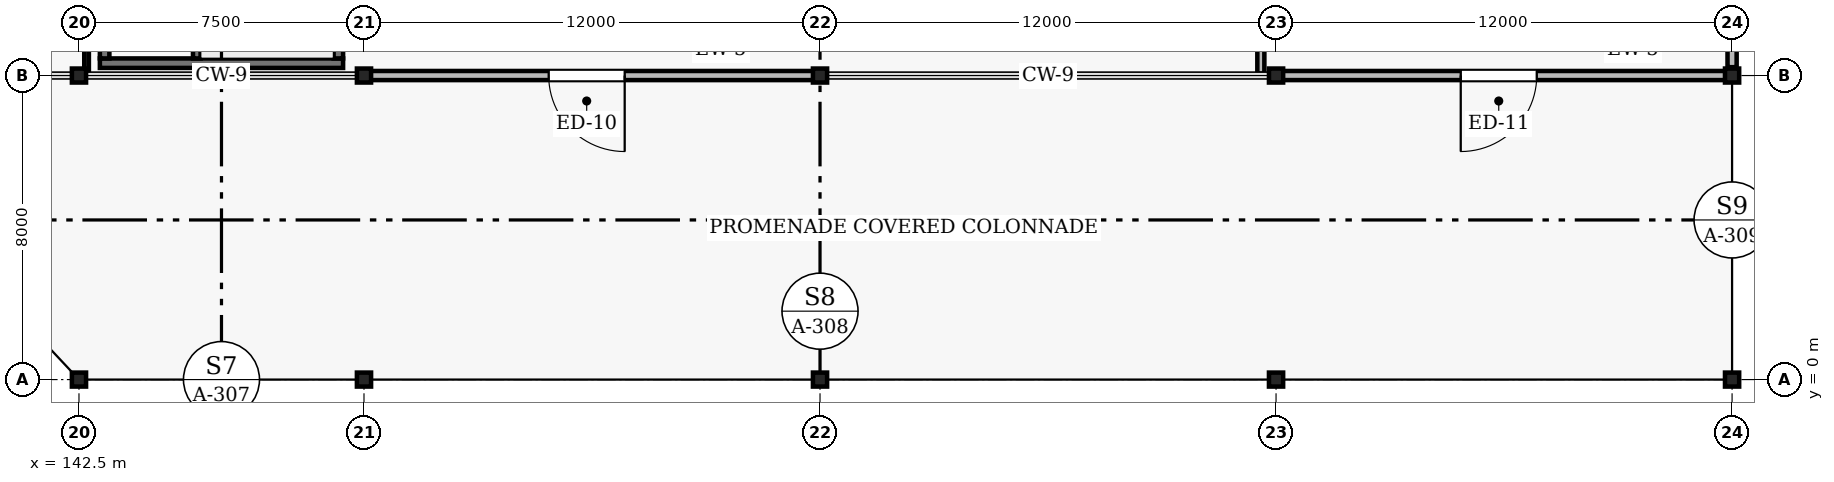
"""IFC4 building model, lengths in metres.
Left out: names, types, materials, properties, quantities, classifications, styles, units other than length and angle.
Written with IfcOpenShell. Run it as: python <this file> out.ifc"""

import sys

from ifc_helpers import new_model, si_unit, direction, frame, frame_2d, origin, origin_2d, place, context, subcontext, project, spatial, rectangle, i_section, extrude, element, fill, save


model = new_model("IFC4")
c1 = context("Model", 3, precision=1e-05, world=origin(), true_north=direction((0.0, 1.0)))
c2 = subcontext(c1, "Body", "Model", "MODEL_VIEW")
j1 = project(units=[si_unit("LENGTHUNIT", "METRE"), si_unit("PLANEANGLEUNIT", "RADIAN")], contexts=[c1])
p1 = place(None, origin())
s1 = spatial("IfcSite", under=j1, at=p1, CompositionType="ELEMENT")
p2 = place(p1, origin())
s2 = spatial("IfcBuilding", under=s1, at=p2, CompositionType="ELEMENT")
p3 = place(p2, origin())
s3 = spatial("IfcBuildingStorey", under=s2, at=p3, CompositionType="ELEMENT", Elevation=0.0)
for number, where, z_axis, x_axis in (
    (1, (142.5, 0.0, 0.0), (0.0, 0.0, 1.0), (1.0, 0.0, 0.0)),
    (2, (142.5, 8.0, 0.0), (0.0, 0.0, 1.0), (1.0, 0.0, 0.0)),
    (3, (150.0, 0.0, 0.0), (0.0, 0.0, 1.0), (1.0, 0.0, 0.0)),
    (4, (150.0, 8.0, 0.0), (0.0, 0.0, 1.0), (1.0, 0.0, 0.0)),
    (5, (162.0, 0.0, 0.0), (0.0, 0.0, 1.0), (1.0, 0.0, 0.0)),
    (6, (162.0, 8.0, 0.0), (0.0, 0.0, 1.0), (1.0, 0.0, 0.0)),
    (7, (174.0, 0.0, 0.0), (0.0, 0.0, 1.0), (1.0, 0.0, 0.0)),
    (8, (174.0, 8.0, 0.0), (0.0, 0.0, 1.0), (1.0, 0.0, 0.0)),
    (9, (186.0, 0.0, 0.0), (0.0, 0.0, 1.0), (1.0, 0.0, 0.0)),
    (10, (186.0, 8.0, 0.0), (0.0, 0.0, 1.0), (1.0, 0.0, 0.0)),
):
    element("IfcColumn", number, at=place(p3, frame(where, z_axis=z_axis, x_axis=x_axis)), inside=s3, PredefinedType="COLUMN", context=c2, shape_type="SweptSolid", body=[
        extrude(i_section(OverallWidth=0.373, OverallDepth=0.368, WebThickness=0.015, FlangeThickness=0.024, FilletRadius=0.015, at=origin_2d()), origin(), (0.0, 0.0, 1.0), 4.5),
    ])
p4 = place(p3, frame((150.08, 8.0, 0.0), z_axis=(0.0, 0.0, 1.0), x_axis=(1.0, 0.0, 0.0)))
e11 = element("IfcWall", 11, at=p4, inside=s3, PredefinedType="SOLIDWALL", context=c2, shape_type="SweptSolid", body=[
    extrude(rectangle(XDim=11.84, YDim=0.24, at=frame_2d((5.92, 0.0))), origin(), (0.0, 0.0, 1.0), 3.75),
])
p5 = place(p4, frame((4.78, 0.0, 0.0)))
e12 = element("IfcOpeningElement", 12, at=p5, cuts=e11, PredefinedType="OPENING", context=c2, shape_type="SweptSolid", body=[
    extrude(rectangle(XDim=2.0, YDim=2.2, at=frame_2d((1.0, 1.1))), frame((0.0, 0.13, 0.0), z_axis=(0.0, -1.0, 0.0), x_axis=(1.0, 0.0, 0.0)), (0.0, 0.0, 1.0), 0.26),
])
p6 = place(p3, frame((174.08, 8.0, 0.0), z_axis=(0.0, 0.0, 1.0), x_axis=(1.0, 0.0, 0.0)))
e13 = element("IfcWall", 13, at=p6, inside=s3, PredefinedType="SOLIDWALL", context=c2, shape_type="SweptSolid", body=[
    extrude(rectangle(XDim=11.84, YDim=0.24, at=frame_2d((5.92, 0.0))), origin(), (0.0, 0.0, 1.0), 3.75),
])
p7 = place(p6, frame((4.78, 0.0, 0.0)))
e14 = element("IfcOpeningElement", 14, at=p7, cuts=e13, PredefinedType="OPENING", context=c2, shape_type="SweptSolid", body=[
    extrude(rectangle(XDim=2.0, YDim=2.2, at=frame_2d((1.0, 1.1))), frame((0.0, 0.13, 0.0), z_axis=(0.0, -1.0, 0.0), x_axis=(1.0, 0.0, 0.0)), (0.0, 0.0, 1.0), 0.26),
])
p8 = place(p3, frame((186.0, 8.22, 0.0), z_axis=(0.0, 0.0, 1.0), x_axis=(0.0, 1.0, 0.0)))
e15 = element("IfcWall", 15, at=p8, inside=s3, PredefinedType="SOLIDWALL", context=c2, shape_type="SweptSolid", body=[
    extrude(rectangle(XDim=15.56, YDim=0.24, at=frame_2d((7.78, 0.0))), origin(), (0.0, 0.0, 1.0), 3.581),
])
p9 = place(p8, frame((1.8, 0.0, 1.05)))
e16 = element("IfcOpeningElement", 16, at=p9, cuts=e15, PredefinedType="OPENING", context=c2, shape_type="SweptSolid", body=[
    extrude(rectangle(XDim=2.0, YDim=1.5, at=frame_2d((1.0, 0.75))), frame((0.0, 0.13, 0.0), z_axis=(0.0, -1.0, 0.0), x_axis=(1.0, 0.0, 0.0)), (0.0, 0.0, 1.0), 0.26),
])
p10 = place(p8, frame((5.8, 0.0, 1.05)))
e17 = element("IfcOpeningElement", 17, at=p10, cuts=e15, PredefinedType="OPENING", context=c2, shape_type="SweptSolid", body=[
    extrude(rectangle(XDim=2.1, YDim=1.5, at=frame_2d((1.05, 0.75))), frame((0.0, 0.13, 0.0), z_axis=(0.0, -1.0, 0.0), x_axis=(1.0, 0.0, 0.0)), (0.0, 0.0, 1.0), 0.26),
])
p11 = place(p8, frame((9.8, 0.0, 1.05)))
e18 = element("IfcOpeningElement", 18, at=p11, cuts=e15, PredefinedType="OPENING", context=c2, shape_type="SweptSolid", body=[
    extrude(rectangle(XDim=2.2, YDim=1.6, at=frame_2d((1.1, 0.8))), frame((0.0, 0.13, 0.0), z_axis=(0.0, -1.0, 0.0), x_axis=(1.0, 0.0, 0.0)), (0.0, 0.0, 1.0), 0.26),
])
p12 = place(p3, frame((143.05, 8.325, 0.0), z_axis=(0.0, 0.0, 1.0), x_axis=(1.0, 0.0, 0.0)))
e19 = element("IfcWall", 19, at=p12, inside=s3, PredefinedType="SHEAR", context=c2, shape_type="SweptSolid", body=[
    extrude(rectangle(XDim=6.4, YDim=0.25, at=frame_2d((3.2, 0.0))), origin(), (0.0, 0.0, 1.0), 4.5),
])
for number, where, z_axis, x_axis in (
    (20, (143.175, 8.45, 0.0), (0.0, 0.0, 1.0), (0.0, 1.0, 0.0)),
    (21, (149.325, 8.45, 0.0), (0.0, 0.0, 1.0), (0.0, 1.0, 0.0)),
):
    element("IfcWall", number, at=place(p3, frame(where, z_axis=z_axis, x_axis=x_axis)), inside=s3, PredefinedType="SHEAR", context=c2, shape_type="SweptSolid", body=[
        extrude(rectangle(XDim=6.7, YDim=0.25, at=frame_2d((3.35, 0.0))), origin(), (0.0, 0.0, 1.0), 4.5),
    ])
p13 = place(p3, frame((145.6, 8.45, 0.0), z_axis=(0.0, 0.0, 1.0), x_axis=(0.0, 1.0, 0.0)))
e22 = element("IfcWall", 22, at=p13, inside=s3, PredefinedType="SHEAR", context=c2, shape_type="SweptSolid", body=[
    extrude(rectangle(XDim=6.7, YDim=0.2, at=frame_2d((3.35, 0.0))), origin(), (0.0, 0.0, 1.0), 4.5),
])
p14 = place(p3, frame((142.7, 8.05, 0.0), z_axis=(0.0, 0.0, 1.0), x_axis=(0.0, 1.0, 0.0)))
e23 = element("IfcWall", 23, at=p14, inside=s3, PredefinedType="PARTITIONING", context=c2, shape_type="SweptSolid", body=[
    extrude(rectangle(XDim=7.25, YDim=0.122, at=frame_2d((3.625, 0.0))), origin(), (0.0, 0.0, 1.0), 3.581),
])
p15 = place(p3, frame((173.6, 8.05, 0.0), z_axis=(0.0, 0.0, 1.0), x_axis=(0.0, 1.0, 0.0)))
e24 = element("IfcWall", 24, at=p15, inside=s3, PredefinedType="PARTITIONING", context=c2, shape_type="SweptSolid", body=[
    extrude(rectangle(XDim=7.25, YDim=0.185, at=frame_2d((3.625, 0.0))), origin(), (0.0, 0.0, 1.0), 3.581),
])
p16 = place(p5, frame((2.0, 0.0, 0.0), z_axis=(0.0, 0.0, 1.0), x_axis=(-1.0, 0.0, 0.0)))
e25 = element("IfcDoor", 25, at=p16, inside=s3, OperationType="SINGLE_SWING_LEFT", PredefinedType="DOOR", context=c2, shape_type="SweptSolid", body=[
    extrude(rectangle(XDim=2.0, YDim=2.2, at=frame_2d((1.0, 1.1))), frame((0.0, 0.025, 0.0), z_axis=(0.0, -1.0, 0.0), x_axis=(1.0, 0.0, 0.0)), (0.0, 0.0, 1.0), 0.05),
])
fill(e12, e25)
p17 = place(p7, frame((2.0, 0.0, 0.0), z_axis=(0.0, 0.0, 1.0), x_axis=(-1.0, 0.0, 0.0)))
e26 = element("IfcDoor", 26, at=p17, inside=s3, OperationType="SINGLE_SWING_RIGHT", PredefinedType="DOOR", context=c2, shape_type="SweptSolid", body=[
    extrude(rectangle(XDim=2.0, YDim=2.2, at=frame_2d((1.0, 1.1))), frame((0.0, 0.025, 0.0), z_axis=(0.0, -1.0, 0.0), x_axis=(1.0, 0.0, 0.0)), (0.0, 0.0, 1.0), 0.05),
])
fill(e14, e26)
save(model, sys.argv[1])
